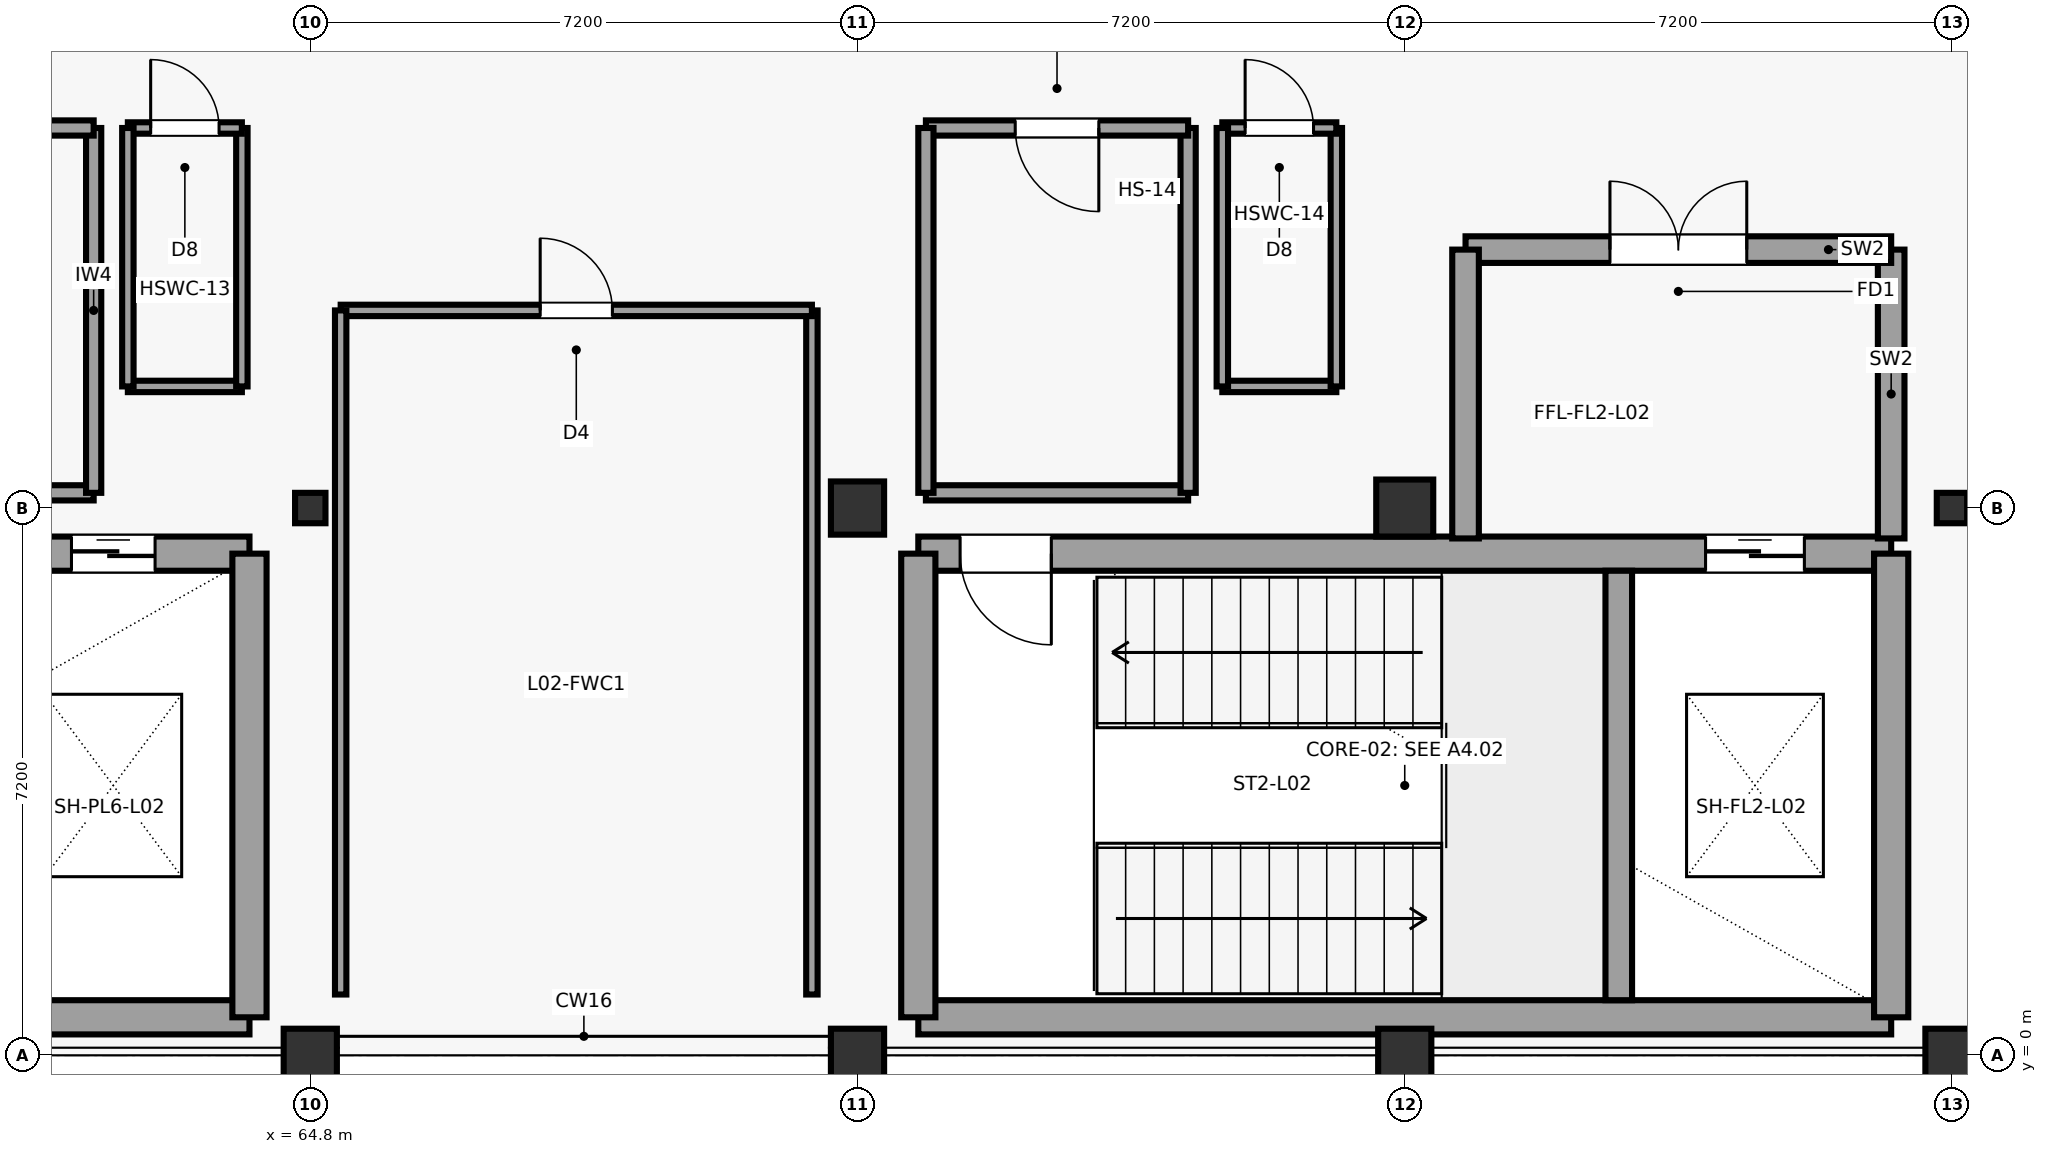
"""IFC4 building model, lengths in metres.
Left out: names, types, materials, properties, quantities, classifications, styles, units other than length and angle.
Written with IfcOpenShell. Run it as: python <this file> out.ifc"""

import sys

from ifc_helpers import new_model, si_unit, direction, frame, frame_2d, origin, origin_2d, place, context, subcontext, project, spatial, rectangle, hollow_rectangle, extrude, element, fill, save


model = new_model("IFC4")
c1 = context("Model", 3, precision=1e-05, world=origin(), true_north=direction((0.0, 1.0)))
c2 = subcontext(c1, "Body", "Model", "MODEL_VIEW")
j1 = project(units=[si_unit("LENGTHUNIT", "METRE"), si_unit("PLANEANGLEUNIT", "RADIAN")], contexts=[c1])
p1 = place(None, origin())
s1 = spatial("IfcSite", under=j1, at=p1, CompositionType="ELEMENT")
p2 = place(p1, origin())
s2 = spatial("IfcBuilding", under=s1, at=p2, CompositionType="ELEMENT")
p3 = place(p2, frame((0.0, 0.0, 9.6)))
s3 = spatial("IfcBuildingStorey", under=s2, at=p3, CompositionType="ELEMENT", Elevation=9.6)
p4 = place(p3, frame((64.8, 0.0, 0.0), z_axis=(0.0, 0.0, 1.0), x_axis=(1.0, 0.0, 0.0)))
e1 = element("IfcColumn", 1, at=p4, inside=s3, PredefinedType="COLUMN", context=c2, shape_type="SweptSolid", body=[
    extrude(rectangle(XDim=0.7, YDim=0.7, at=origin_2d()), origin(), (0.0, 0.0, 1.0), 4.2),
])
p5 = place(p3, frame((64.8, 7.2, 0.0), z_axis=(0.0, 0.0, 1.0), x_axis=(1.0, 0.0, 0.0)))
e2 = element("IfcColumn", 2, at=p5, inside=s3, PredefinedType="COLUMN", context=c2, shape_type="SweptSolid", body=[
    extrude(hollow_rectangle(XDim=0.4, YDim=0.4, WallThickness=0.02, at=origin_2d()), origin(), (0.0, 0.0, 1.0), 4.2),
])
for number, where, z_axis, x_axis in (
    (3, (72.0, 0.0, 0.0), (0.0, 0.0, 1.0), (1.0, 0.0, 0.0)),
    (4, (72.0, 7.2, 0.0), (0.0, 0.0, 1.0), (1.0, 0.0, 0.0)),
    (5, (79.2, 0.0, 0.0), (0.0, 0.0, 1.0), (1.0, 0.0, 0.0)),
):
    element("IfcColumn", number, at=place(p3, frame(where, z_axis=z_axis, x_axis=x_axis)), inside=s3, PredefinedType="COLUMN", context=c2, shape_type="SweptSolid", body=[
        extrude(rectangle(XDim=0.7, YDim=0.7, at=origin_2d()), origin(), (0.0, 0.0, 1.0), 4.2),
    ])
p6 = place(p3, frame((79.2, 7.2, 0.0), z_axis=(0.0, 0.0, 1.0), x_axis=(1.0, 0.0, 0.0)))
e6 = element("IfcColumn", 6, at=p6, inside=s3, PredefinedType="COLUMN", context=c2, shape_type="SweptSolid", body=[
    extrude(rectangle(XDim=0.75, YDim=0.75, at=origin_2d()), origin(), (0.0, 0.0, 1.0), 4.2),
])
p7 = place(p3, frame((86.4, 0.0, 0.0), z_axis=(0.0, 0.0, 1.0), x_axis=(1.0, 0.0, 0.0)))
e7 = element("IfcColumn", 7, at=p7, inside=s3, PredefinedType="COLUMN", context=c2, shape_type="SweptSolid", body=[
    extrude(rectangle(XDim=0.7, YDim=0.7, at=origin_2d()), origin(), (0.0, 0.0, 1.0), 4.2),
])
p8 = place(p3, frame((86.4, 7.2, 0.0), z_axis=(0.0, 0.0, 1.0), x_axis=(1.0, 0.0, 0.0)))
e8 = element("IfcColumn", 8, at=p8, inside=s3, PredefinedType="COLUMN", context=c2, shape_type="SweptSolid", body=[
    extrude(hollow_rectangle(XDim=0.4, YDim=0.4, WallThickness=0.02, at=origin_2d()), origin(), (0.0, 0.0, 1.0), 4.2),
])
p9 = place(p3, frame((72.8, 0.5, 0.0), z_axis=(0.0, 0.0, 1.0), x_axis=(1.0, 0.0, 0.0)))
e9 = element("IfcWall", 9, at=p9, inside=s3, PredefinedType="SHEAR", context=c2, shape_type="SweptSolid", body=[
    extrude(rectangle(XDim=12.8, YDim=0.45, at=frame_2d((6.4, 0.0))), origin(), (0.0, 0.0, 1.0), 3.88),
])
p10 = place(p3, frame((72.8, 6.6, 0.0), z_axis=(0.0, 0.0, 1.0), x_axis=(1.0, 0.0, 0.0)))
e10 = element("IfcWall", 10, at=p10, inside=s3, PredefinedType="SHEAR", context=c2, shape_type="SweptSolid", body=[
    extrude(rectangle(XDim=12.8, YDim=0.45, at=frame_2d((6.4, 0.0))), origin(), (0.0, 0.0, 1.0), 3.88),
])
p11 = place(p10, frame((0.55, 0.0, 0.0)))
e11 = element("IfcOpeningElement", 11, at=p11, cuts=e10, PredefinedType="OPENING", context=c2, shape_type="SweptSolid", body=[
    extrude(rectangle(XDim=1.2, YDim=2.25, at=frame_2d((0.6, 1.125))), frame((0.0, 0.235, 0.0), z_axis=(0.0, -1.0, 0.0), x_axis=(1.0, 0.0, 0.0)), (0.0, 0.0, 1.0), 0.47),
])
p12 = place(p10, frame((10.358, 0.0, 0.0)))
e12 = element("IfcOpeningElement", 12, at=p12, cuts=e10, PredefinedType="OPENING", context=c2, shape_type="SweptSolid", body=[
    extrude(rectangle(XDim=1.3, YDim=2.25, at=frame_2d((0.65, 1.125))), frame((0.0, 0.235, 0.0), z_axis=(0.0, -1.0, 0.0), x_axis=(1.0, 0.0, 0.0)), (0.0, 0.0, 1.0), 0.47),
])
for number, where, z_axis, x_axis in (
    (13, (72.8, 0.5, 0.0), (0.0, 0.0, 1.0), (0.0, 1.0, 0.0)),
    (14, (85.6, 0.5, 0.0), (0.0, 0.0, 1.0), (0.0, 1.0, 0.0)),
):
    element("IfcWall", number, at=place(p3, frame(where, z_axis=z_axis, x_axis=x_axis)), inside=s3, PredefinedType="SHEAR", context=c2, shape_type="SweptSolid", body=[
        extrude(rectangle(XDim=6.1, YDim=0.45, at=frame_2d((3.05, 0.0))), origin(), (0.0, 0.0, 1.0), 3.88),
    ])
p13 = place(p3, frame((82.016, 0.725, 0.0), z_axis=(0.0, 0.0, 1.0), x_axis=(0.0, 1.0, 0.0)))
e15 = element("IfcWall", 15, at=p13, inside=s3, PredefinedType="SHEAR", context=c2, shape_type="SweptSolid", body=[
    extrude(rectangle(XDim=5.65, YDim=0.35, at=frame_2d((2.825, 0.0))), origin(), (0.0, 0.0, 1.0), 3.88),
])
p14 = place(p3, frame((51.2, 0.5, 0.0), z_axis=(0.0, 0.0, 1.0), x_axis=(1.0, 0.0, 0.0)))
e16 = element("IfcWall", 16, at=p14, inside=s3, PredefinedType="SHEAR", context=c2, shape_type="SweptSolid", body=[
    extrude(rectangle(XDim=12.8, YDim=0.45, at=frame_2d((6.4, 0.0))), origin(), (0.0, 0.0, 1.0), 3.88),
])
p15 = place(p3, frame((51.2, 6.6, 0.0), z_axis=(0.0, 0.0, 1.0), x_axis=(1.0, 0.0, 0.0)))
e17 = element("IfcWall", 17, at=p15, inside=s3, PredefinedType="SHEAR", context=c2, shape_type="SweptSolid", body=[
    extrude(rectangle(XDim=12.8, YDim=0.45, at=frame_2d((6.4, 0.0))), origin(), (0.0, 0.0, 1.0), 3.88),
])
p16 = place(p15, frame((0.55, 0.0, 0.0)))
e18 = element("IfcOpeningElement", 18, at=p16, cuts=e17, PredefinedType="OPENING", context=c2, shape_type="SweptSolid", body=[
    extrude(rectangle(XDim=1.2, YDim=2.25, at=frame_2d((0.6, 1.125))), frame((0.0, 0.235, 0.0), z_axis=(0.0, -1.0, 0.0), x_axis=(1.0, 0.0, 0.0)), (0.0, 0.0, 1.0), 0.47),
])
p17 = place(p15, frame((10.458, 0.0, 0.0)))
e19 = element("IfcOpeningElement", 19, at=p17, cuts=e17, PredefinedType="OPENING", context=c2, shape_type="SweptSolid", body=[
    extrude(rectangle(XDim=1.1, YDim=2.2, at=frame_2d((0.55, 1.1))), frame((0.0, 0.235, 0.0), z_axis=(0.0, -1.0, 0.0), x_axis=(1.0, 0.0, 0.0)), (0.0, 0.0, 1.0), 0.47),
])
p18 = place(p3, frame((64.0, 0.5, 0.0), z_axis=(0.0, 0.0, 1.0), x_axis=(0.0, 1.0, 0.0)))
e20 = element("IfcWall", 20, at=p18, inside=s3, PredefinedType="SHEAR", context=c2, shape_type="SweptSolid", body=[
    extrude(rectangle(XDim=6.1, YDim=0.45, at=frame_2d((3.05, 0.0))), origin(), (0.0, 0.0, 1.0), 3.88),
])
p19 = place(p3, frame((85.6, 6.8, 0.0), z_axis=(0.0, 0.0, 1.0), x_axis=(0.0, 1.0, 0.0)))
e21 = element("IfcWall", 21, at=p19, inside=s3, PredefinedType="SHEAR", context=c2, shape_type="SweptSolid", body=[
    extrude(rectangle(XDim=3.8, YDim=0.35, at=frame_2d((1.9, 0.0))), origin(), (0.0, 0.0, 1.0), 2.94),
])
p20 = place(p3, frame((85.6, 10.6, 0.0), z_axis=(0.0, 0.0, 1.0), x_axis=(-1.0, 0.0, 0.0)))
e22 = element("IfcWall", 22, at=p20, inside=s3, PredefinedType="SHEAR", context=c2, shape_type="SweptSolid", body=[
    extrude(rectangle(XDim=5.6, YDim=0.35, at=frame_2d((2.8, 0.0))), origin(), (0.0, 0.0, 1.0), 2.94),
])
p21 = place(p20, frame((1.9, 0.0, 0.0)))
e23 = element("IfcOpeningElement", 23, at=p21, cuts=e22, PredefinedType="OPENING", context=c2, shape_type="SweptSolid", body=[
    extrude(rectangle(XDim=1.8, YDim=2.3, at=frame_2d((0.9, 1.15))), frame((0.0, 0.185, 0.0), z_axis=(0.0, -1.0, 0.0), x_axis=(1.0, 0.0, 0.0)), (0.0, 0.0, 1.0), 0.37),
])
p22 = place(p3, frame((80.0, 10.6, 0.0), z_axis=(0.0, 0.0, 1.0), x_axis=(0.0, -1.0, 0.0)))
e24 = element("IfcWall", 24, at=p22, inside=s3, PredefinedType="SHEAR", context=c2, shape_type="SweptSolid", body=[
    extrude(rectangle(XDim=3.8, YDim=0.35, at=frame_2d((1.9, 0.0))), origin(), (0.0, 0.0, 1.0), 2.94),
])
p23 = place(p3, frame((71.4, 0.8, 0.0), z_axis=(0.0, 0.0, 1.0), x_axis=(0.0, 1.0, 0.0)))
e25 = element("IfcWall", 25, at=p23, inside=s3, PredefinedType="PARTITIONING", context=c2, shape_type="SweptSolid", body=[
    extrude(rectangle(XDim=9.0, YDim=0.15, at=frame_2d((4.5, 0.0))), origin(), (0.0, 0.0, 1.0), 2.94),
])
p24 = place(p3, frame((71.4, 9.8, 0.0), z_axis=(0.0, 0.0, 1.0), x_axis=(-1.0, 0.0, 0.0)))
e26 = element("IfcWall", 26, at=p24, inside=s3, PredefinedType="PARTITIONING", context=c2, shape_type="SweptSolid", body=[
    extrude(rectangle(XDim=6.2, YDim=0.15, at=frame_2d((3.1, 0.0))), origin(), (0.0, 0.0, 1.0), 2.94),
])
p25 = place(p24, frame((2.625, 0.0, 0.0)))
e27 = element("IfcOpeningElement", 27, at=p25, cuts=e26, PredefinedType="OPENING", context=c2, shape_type="SweptSolid", body=[
    extrude(rectangle(XDim=0.95, YDim=2.15, at=frame_2d((0.475, 1.075))), frame((0.0, 0.085, 0.0), z_axis=(0.0, -1.0, 0.0), x_axis=(1.0, 0.0, 0.0)), (0.0, 0.0, 1.0), 0.17),
])
p26 = place(p3, frame((65.2, 9.8, 0.0), z_axis=(0.0, 0.0, 1.0), x_axis=(0.0, -1.0, 0.0)))
e28 = element("IfcWall", 28, at=p26, inside=s3, PredefinedType="PARTITIONING", context=c2, shape_type="SweptSolid", body=[
    extrude(rectangle(XDim=9.0, YDim=0.15, at=frame_2d((4.5, 0.0))), origin(), (0.0, 0.0, 1.0), 2.94),
])
p27 = place(p3, frame((58.5, 7.4, 0.0), z_axis=(0.0, 0.0, 1.0), x_axis=(1.0, 0.0, 0.0)))
e29 = element("IfcWall", 29, at=p27, inside=s3, PredefinedType="PARTITIONING", context=c2, shape_type="SweptSolid", body=[
    extrude(rectangle(XDim=3.45, YDim=0.2, at=frame_2d((1.725, 0.0))), origin(), (0.0, 0.0, 1.0), 2.94),
])
p28 = place(p3, frame((61.95, 7.4, 0.0), z_axis=(0.0, 0.0, 1.0), x_axis=(0.0, 1.0, 0.0)))
e30 = element("IfcWall", 30, at=p28, inside=s3, PredefinedType="PARTITIONING", context=c2, shape_type="SweptSolid", body=[
    extrude(rectangle(XDim=4.8, YDim=0.2, at=frame_2d((2.4, 0.0))), origin(), (0.0, 0.0, 1.0), 2.94),
])
p29 = place(p3, frame((61.95, 12.2, 0.0), z_axis=(0.0, 0.0, 1.0), x_axis=(-1.0, 0.0, 0.0)))
e31 = element("IfcWall", 31, at=p29, inside=s3, PredefinedType="PARTITIONING", context=c2, shape_type="SweptSolid", body=[
    extrude(rectangle(XDim=3.45, YDim=0.2, at=frame_2d((1.725, 0.0))), origin(), (0.0, 0.0, 1.0), 2.94),
])
p30 = place(p29, frame((1.175, 0.0, 0.0)))
e32 = element("IfcOpeningElement", 32, at=p30, cuts=e31, PredefinedType="OPENING", context=c2, shape_type="SweptSolid", body=[
    extrude(rectangle(XDim=1.1, YDim=2.25, at=frame_2d((0.55, 1.125))), frame((0.0, 0.11, 0.0), z_axis=(0.0, -1.0, 0.0), x_axis=(1.0, 0.0, 0.0)), (0.0, 0.0, 1.0), 0.22),
])
p31 = place(p3, frame((62.4, 8.8, 0.0), z_axis=(0.0, 0.0, 1.0), x_axis=(1.0, 0.0, 0.0)))
e33 = element("IfcWall", 33, at=p31, inside=s3, PredefinedType="PARTITIONING", context=c2, shape_type="SweptSolid", body=[
    extrude(rectangle(XDim=1.5, YDim=0.15, at=frame_2d((0.75, 0.0))), origin(), (0.0, 0.0, 1.0), 2.94),
])
p32 = place(p3, frame((63.9, 8.8, 0.0), z_axis=(0.0, 0.0, 1.0), x_axis=(0.0, 1.0, 0.0)))
e34 = element("IfcWall", 34, at=p32, inside=s3, PredefinedType="PARTITIONING", context=c2, shape_type="SweptSolid", body=[
    extrude(rectangle(XDim=3.4, YDim=0.15, at=frame_2d((1.7, 0.0))), origin(), (0.0, 0.0, 1.0), 2.94),
])
p33 = place(p3, frame((63.9, 12.2, 0.0), z_axis=(0.0, 0.0, 1.0), x_axis=(-1.0, 0.0, 0.0)))
e35 = element("IfcWall", 35, at=p33, inside=s3, PredefinedType="PARTITIONING", context=c2, shape_type="SweptSolid", body=[
    extrude(rectangle(XDim=1.5, YDim=0.15, at=frame_2d((0.75, 0.0))), origin(), (0.0, 0.0, 1.0), 2.94),
])
p34 = place(p33, frame((0.3, 0.0, 0.0)))
e36 = element("IfcOpeningElement", 36, at=p34, cuts=e35, PredefinedType="OPENING", context=c2, shape_type="SweptSolid", body=[
    extrude(rectangle(XDim=0.9, YDim=2.15, at=frame_2d((0.45, 1.075))), frame((0.0, 0.085, 0.0), z_axis=(0.0, -1.0, 0.0), x_axis=(1.0, 0.0, 0.0)), (0.0, 0.0, 1.0), 0.17),
])
p35 = place(p3, frame((62.4, 12.2, 0.0), z_axis=(0.0, 0.0, 1.0), x_axis=(0.0, -1.0, 0.0)))
e37 = element("IfcWall", 37, at=p35, inside=s3, PredefinedType="PARTITIONING", context=c2, shape_type="SweptSolid", body=[
    extrude(rectangle(XDim=3.4, YDim=0.15, at=frame_2d((1.7, 0.0))), origin(), (0.0, 0.0, 1.0), 2.94),
])
p36 = place(p3, frame((72.9, 7.4, 0.0), z_axis=(0.0, 0.0, 1.0), x_axis=(1.0, 0.0, 0.0)))
e38 = element("IfcWall", 38, at=p36, inside=s3, PredefinedType="PARTITIONING", context=c2, shape_type="SweptSolid", body=[
    extrude(rectangle(XDim=3.45, YDim=0.2, at=frame_2d((1.725, 0.0))), origin(), (0.0, 0.0, 1.0), 2.94),
])
p37 = place(p3, frame((76.35, 7.4, 0.0), z_axis=(0.0, 0.0, 1.0), x_axis=(0.0, 1.0, 0.0)))
e39 = element("IfcWall", 39, at=p37, inside=s3, PredefinedType="PARTITIONING", context=c2, shape_type="SweptSolid", body=[
    extrude(rectangle(XDim=4.8, YDim=0.2, at=frame_2d((2.4, 0.0))), origin(), (0.0, 0.0, 1.0), 2.94),
])
p38 = place(p3, frame((76.35, 12.2, 0.0), z_axis=(0.0, 0.0, 1.0), x_axis=(-1.0, 0.0, 0.0)))
e40 = element("IfcWall", 40, at=p38, inside=s3, PredefinedType="PARTITIONING", context=c2, shape_type="SweptSolid", body=[
    extrude(rectangle(XDim=3.45, YDim=0.2, at=frame_2d((1.725, 0.0))), origin(), (0.0, 0.0, 1.0), 2.94),
])
p39 = place(p38, frame((1.175, 0.0, 0.0)))
e41 = element("IfcOpeningElement", 41, at=p39, cuts=e40, PredefinedType="OPENING", context=c2, shape_type="SweptSolid", body=[
    extrude(rectangle(XDim=1.1, YDim=2.25, at=frame_2d((0.55, 1.125))), frame((0.0, 0.11, 0.0), z_axis=(0.0, -1.0, 0.0), x_axis=(1.0, 0.0, 0.0)), (0.0, 0.0, 1.0), 0.22),
])
p40 = place(p3, frame((72.9, 12.2, 0.0), z_axis=(0.0, 0.0, 1.0), x_axis=(0.0, -1.0, 0.0)))
e42 = element("IfcWall", 42, at=p40, inside=s3, PredefinedType="PARTITIONING", context=c2, shape_type="SweptSolid", body=[
    extrude(rectangle(XDim=4.8, YDim=0.2, at=frame_2d((2.4, 0.0))), origin(), (0.0, 0.0, 1.0), 2.94),
])
p41 = place(p3, frame((76.8, 8.8, 0.0), z_axis=(0.0, 0.0, 1.0), x_axis=(1.0, 0.0, 0.0)))
e43 = element("IfcWall", 43, at=p41, inside=s3, PredefinedType="PARTITIONING", context=c2, shape_type="SweptSolid", body=[
    extrude(rectangle(XDim=1.5, YDim=0.15, at=frame_2d((0.75, 0.0))), origin(), (0.0, 0.0, 1.0), 2.94),
])
p42 = place(p3, frame((78.3, 8.8, 0.0), z_axis=(0.0, 0.0, 1.0), x_axis=(0.0, 1.0, 0.0)))
e44 = element("IfcWall", 44, at=p42, inside=s3, PredefinedType="PARTITIONING", context=c2, shape_type="SweptSolid", body=[
    extrude(rectangle(XDim=3.4, YDim=0.15, at=frame_2d((1.7, 0.0))), origin(), (0.0, 0.0, 1.0), 2.94),
])
p43 = place(p3, frame((78.3, 12.2, 0.0), z_axis=(0.0, 0.0, 1.0), x_axis=(-1.0, 0.0, 0.0)))
e45 = element("IfcWall", 45, at=p43, inside=s3, PredefinedType="PARTITIONING", context=c2, shape_type="SweptSolid", body=[
    extrude(rectangle(XDim=1.5, YDim=0.15, at=frame_2d((0.75, 0.0))), origin(), (0.0, 0.0, 1.0), 2.94),
])
p44 = place(p43, frame((0.3, 0.0, 0.0)))
e46 = element("IfcOpeningElement", 46, at=p44, cuts=e45, PredefinedType="OPENING", context=c2, shape_type="SweptSolid", body=[
    extrude(rectangle(XDim=0.9, YDim=2.15, at=frame_2d((0.45, 1.075))), frame((0.0, 0.085, 0.0), z_axis=(0.0, -1.0, 0.0), x_axis=(1.0, 0.0, 0.0)), (0.0, 0.0, 1.0), 0.17),
])
p45 = place(p3, frame((76.8, 12.2, 0.0), z_axis=(0.0, 0.0, 1.0), x_axis=(0.0, -1.0, 0.0)))
e47 = element("IfcWall", 47, at=p45, inside=s3, PredefinedType="PARTITIONING", context=c2, shape_type="SweptSolid", body=[
    extrude(rectangle(XDim=3.4, YDim=0.15, at=frame_2d((1.7, 0.0))), origin(), (0.0, 0.0, 1.0), 2.94),
])
p46 = place(p11, frame((1.2, 0.0, 0.0), z_axis=(0.0, 0.0, 1.0), x_axis=(-1.0, 0.0, 0.0)))
e48 = element("IfcDoor", 48, at=p46, inside=s3, OperationType="SINGLE_SWING_RIGHT", PredefinedType="DOOR", context=c2, shape_type="SweptSolid", body=[
    extrude(rectangle(XDim=1.2, YDim=2.25, at=frame_2d((0.6, 1.125))), frame((0.0, 0.025, 0.0), z_axis=(0.0, -1.0, 0.0), x_axis=(1.0, 0.0, 0.0)), (0.0, 0.0, 1.0), 0.05),
])
fill(e11, e48)
p47 = place(p12, origin())
e49 = element("IfcDoor", 49, at=p47, inside=s3, OperationType="SLIDING_TO_RIGHT", PredefinedType="DOOR", context=c2, shape_type="SweptSolid", body=[
    extrude(rectangle(XDim=1.3, YDim=2.25, at=frame_2d((0.65, 1.125))), frame((0.0, 0.025, 0.0), z_axis=(0.0, -1.0, 0.0), x_axis=(1.0, 0.0, 0.0)), (0.0, 0.0, 1.0), 0.05),
])
fill(e12, e49)
p48 = place(p17, origin())
e50 = element("IfcDoor", 50, at=p48, inside=s3, OperationType="SLIDING_TO_LEFT", PredefinedType="DOOR", context=c2, shape_type="SweptSolid", body=[
    extrude(rectangle(XDim=1.1, YDim=2.2, at=frame_2d((0.55, 1.1))), frame((0.0, 0.025, 0.0), z_axis=(0.0, -1.0, 0.0), x_axis=(1.0, 0.0, 0.0)), (0.0, 0.0, 1.0), 0.05),
])
fill(e19, e50)
p49 = place(p21, frame((1.8, 0.0, 0.0), z_axis=(0.0, 0.0, 1.0), x_axis=(-1.0, 0.0, 0.0)))
e51 = element("IfcDoor", 51, at=p49, inside=s3, OperationType="DOUBLE_DOOR_SINGLE_SWING", PredefinedType="DOOR", context=c2, shape_type="SweptSolid", body=[
    extrude(rectangle(XDim=1.8, YDim=2.3, at=frame_2d((0.9, 1.15))), frame((0.0, 0.025, 0.0), z_axis=(0.0, -1.0, 0.0), x_axis=(1.0, 0.0, 0.0)), (0.0, 0.0, 1.0), 0.05),
])
fill(e23, e51)
p50 = place(p25, frame((0.95, 0.0, 0.0), z_axis=(0.0, 0.0, 1.0), x_axis=(-1.0, 0.0, 0.0)))
e52 = element("IfcDoor", 52, at=p50, inside=s3, OperationType="SINGLE_SWING_RIGHT", PredefinedType="DOOR", context=c2, shape_type="SweptSolid", body=[
    extrude(rectangle(XDim=0.95, YDim=2.15, at=frame_2d((0.475, 1.075))), frame((0.0, 0.025, 0.0), z_axis=(0.0, -1.0, 0.0), x_axis=(1.0, 0.0, 0.0)), (0.0, 0.0, 1.0), 0.05),
])
fill(e27, e52)
p51 = place(p34, frame((0.9, 0.0, 0.0), z_axis=(0.0, 0.0, 1.0), x_axis=(-1.0, 0.0, 0.0)))
e53 = element("IfcDoor", 53, at=p51, inside=s3, OperationType="SINGLE_SWING_RIGHT", PredefinedType="DOOR", context=c2, shape_type="SweptSolid", body=[
    extrude(rectangle(XDim=0.9, YDim=2.15, at=frame_2d((0.45, 1.075))), frame((0.0, 0.025, 0.0), z_axis=(0.0, -1.0, 0.0), x_axis=(1.0, 0.0, 0.0)), (0.0, 0.0, 1.0), 0.05),
])
fill(e36, e53)
p52 = place(p39, origin())
e54 = element("IfcDoor", 54, at=p52, inside=s3, OperationType="SINGLE_SWING_LEFT", PredefinedType="DOOR", context=c2, shape_type="SweptSolid", body=[
    extrude(rectangle(XDim=1.1, YDim=2.25, at=frame_2d((0.55, 1.125))), frame((0.0, 0.025, 0.0), z_axis=(0.0, -1.0, 0.0), x_axis=(1.0, 0.0, 0.0)), (0.0, 0.0, 1.0), 0.05),
])
fill(e41, e54)
p53 = place(p44, frame((0.9, 0.0, 0.0), z_axis=(0.0, 0.0, 1.0), x_axis=(-1.0, 0.0, 0.0)))
e55 = element("IfcDoor", 55, at=p53, inside=s3, OperationType="SINGLE_SWING_RIGHT", PredefinedType="DOOR", context=c2, shape_type="SweptSolid", body=[
    extrude(rectangle(XDim=0.9, YDim=2.15, at=frame_2d((0.45, 1.075))), frame((0.0, 0.025, 0.0), z_axis=(0.0, -1.0, 0.0), x_axis=(1.0, 0.0, 0.0)), (0.0, 0.0, 1.0), 0.05),
])
fill(e46, e55)
save(model, sys.argv[1])
